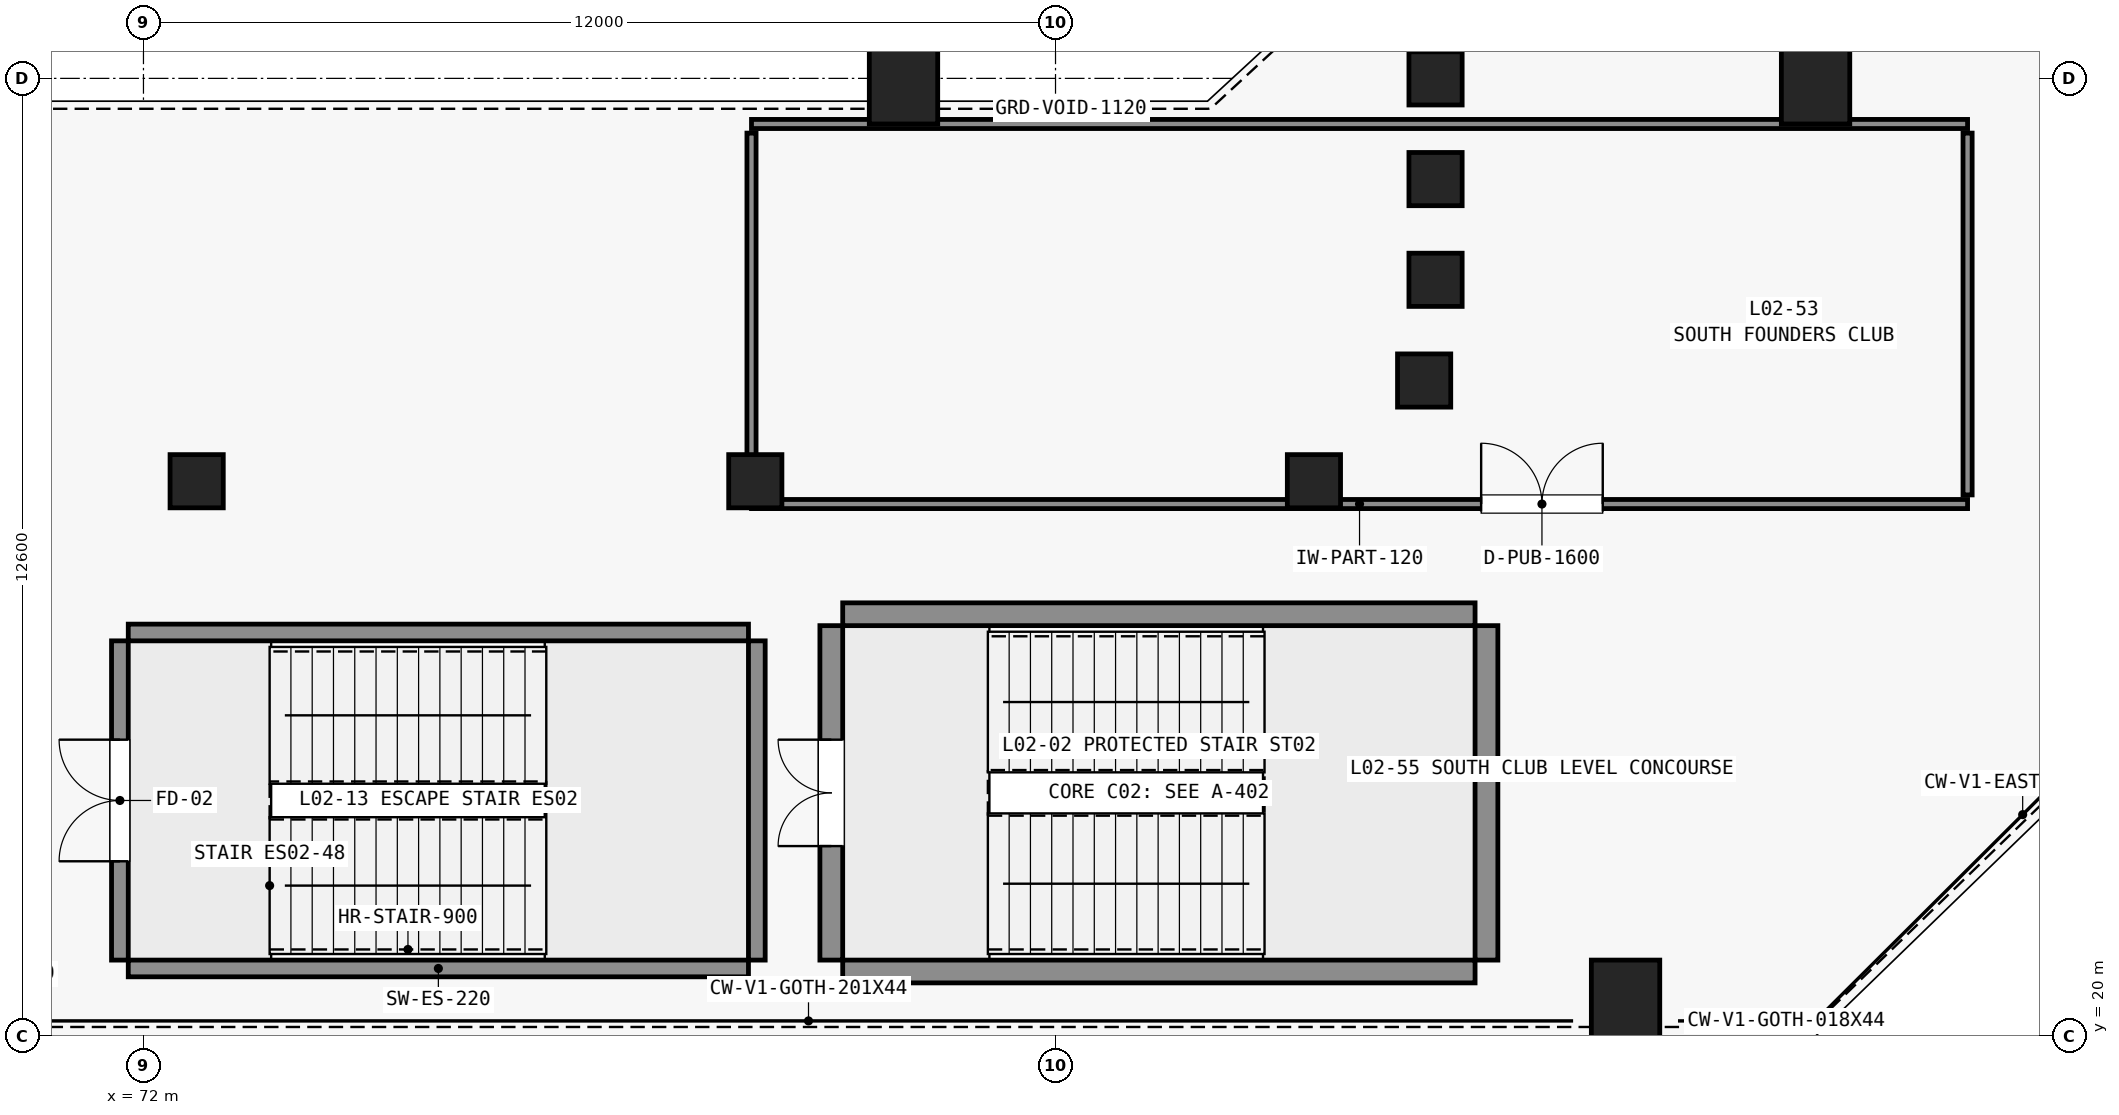
"""IFC4 building model, lengths in metres.
Left out: names, types, materials, properties, quantities, classifications, styles, units other than length and angle.
Written with IfcOpenShell. Run it as: python <this file> out.ifc"""

import sys

from ifc_helpers import new_model, si_unit, direction, frame, frame_2d, origin, origin_2d, place, context, subcontext, project, spatial, rectangle, extrude, element, fill, save


model = new_model("IFC4")
c1 = context("Model", 3, precision=1e-05, world=origin(), true_north=direction((0.0, 1.0)))
c2 = subcontext(c1, "Body", "Model", "MODEL_VIEW")
j1 = project(units=[si_unit("LENGTHUNIT", "METRE"), si_unit("PLANEANGLEUNIT", "RADIAN")], contexts=[c1])
p1 = place(None, origin())
s1 = spatial("IfcSite", under=j1, at=p1, CompositionType="ELEMENT")
p2 = place(p1, origin())
s2 = spatial("IfcBuilding", under=s1, at=p2, CompositionType="ELEMENT")
p3 = place(p2, frame((0.0, 0.0, 11.4)))
s3 = spatial("IfcBuildingStorey", under=s2, at=p3, CompositionType="ELEMENT", Elevation=11.4)
p4 = place(p3, frame((82.0, 32.6, 0.0), z_axis=(0.0, 0.0, 1.0), x_axis=(1.0, 0.0, 0.0)))
e1 = element("IfcColumn", 1, at=p4, inside=s3, PredefinedType="COLUMN", context=c2, shape_type="SweptSolid", body=[
    extrude(rectangle(XDim=0.9, YDim=1.2, at=origin_2d()), origin(), (0.0, 0.0, 1.0), 4.45),
])
p5 = place(p3, frame((94.0, 32.6, 0.0), z_axis=(0.0, 0.0, 1.0), x_axis=(1.0, 0.0, 0.0)))
e2 = element("IfcColumn", 2, at=p5, inside=s3, PredefinedType="COLUMN", context=c2, shape_type="SweptSolid", body=[
    extrude(rectangle(XDim=0.9, YDim=1.2, at=origin_2d()), origin(), (0.0, 0.0, 1.0), 4.8),
])
p6 = place(p3, frame((91.5, 20.4, 0.0), z_axis=(0.0, 0.0, 1.0), x_axis=(1.0, 0.0, 0.0)))
e3 = element("IfcColumn", 3, at=p6, inside=s3, PredefinedType="PILASTER", context=c2, shape_type="SweptSolid", body=[
    extrude(rectangle(XDim=0.9, YDim=1.2, at=origin_2d()), origin(), (0.0, 0.0, 1.0), 4.8),
])
for number, where, z_axis, x_axis in (
    (4, (81.2, 20.85, 0.0), (0.0, 0.0, 1.0), (1.0, 0.0, 0.0)),
    (5, (81.2, 25.55, 0.0), (0.0, 0.0, 1.0), (1.0, 0.0, 0.0)),
):
    element("IfcWall", number, at=place(p3, frame(where, z_axis=z_axis, x_axis=x_axis)), inside=s3, PredefinedType="SHEAR", context=c2, shape_type="SweptSolid", body=[
        extrude(rectangle(XDim=8.32, YDim=0.3, at=frame_2d((4.16, 0.0))), origin(), (0.0, 0.0, 1.0), 4.8),
    ])
p7 = place(p3, frame((81.05, 21.0, 0.0), z_axis=(0.0, 0.0, 1.0), x_axis=(0.0, 1.0, 0.0)))
e6 = element("IfcWall", 6, at=p7, inside=s3, PredefinedType="SHEAR", context=c2, shape_type="SweptSolid", body=[
    extrude(rectangle(XDim=4.4, YDim=0.3, at=frame_2d((2.2, 0.0))), origin(), (0.0, 0.0, 1.0), 4.8),
])
p8 = place(p7, frame((1.5, 0.0, 0.0)))
e7 = element("IfcOpeningElement", 7, at=p8, cuts=e6, PredefinedType="OPENING", context=c2, shape_type="SweptSolid", body=[
    extrude(rectangle(XDim=1.4, YDim=2.2, at=frame_2d((0.7, 1.1))), frame((0.0, 0.16, 0.0), z_axis=(0.0, -1.0, 0.0), x_axis=(1.0, 0.0, 0.0)), (0.0, 0.0, 1.0), 0.32),
])
p9 = place(p3, frame((89.67, 21.0, 0.0), z_axis=(0.0, 0.0, 1.0), x_axis=(0.0, 1.0, 0.0)))
e8 = element("IfcWall", 8, at=p9, inside=s3, PredefinedType="SHEAR", context=c2, shape_type="SweptSolid", body=[
    extrude(rectangle(XDim=4.4, YDim=0.3, at=frame_2d((2.2, 0.0))), origin(), (0.0, 0.0, 1.0), 4.8),
])
for number, where, z_axis, x_axis in (
    (9, (72.7, 27.3, 0.0), (0.0, 0.0, 1.0), (1.0, 0.0, 0.0)),
    (10, (80.05, 27.3, 0.0), (0.0, 0.0, 1.0), (1.0, 0.0, 0.0)),
    (11, (87.4, 27.3, 0.0), (0.0, 0.0, 1.0), (1.0, 0.0, 0.0)),
    (12, (88.85, 28.625, 0.0), (0.0, 0.0, 1.0), (1.0, 0.0, 0.0)),
    (13, (89.0, 29.95, 0.0), (0.0, 0.0, 1.0), (1.0, 0.0, 0.0)),
    (14, (89.0, 31.275, 0.0), (0.0, 0.0, 1.0), (1.0, 0.0, 0.0)),
    (15, (89.0, 32.6, 0.0), (0.0, 0.0, 1.0), (1.0, 0.0, 0.0)),
):
    element("IfcColumn", number, at=place(p3, frame(where, z_axis=z_axis, x_axis=x_axis)), inside=s3, PredefinedType="COLUMN", context=c2, shape_type="SweptSolid", body=[
        extrude(rectangle(XDim=0.7, YDim=0.7, at=origin_2d()), origin(), (0.0, 0.0, 1.0), 4.8),
    ])
for number, where, z_axis, x_axis in (
    (16, (71.8, 20.89, 0.0), (0.0, 0.0, 1.0), (1.0, 0.0, 0.0)),
    (17, (71.8, 25.31, 0.0), (0.0, 0.0, 1.0), (1.0, 0.0, 0.0)),
):
    element("IfcWall", number, at=place(p3, frame(where, z_axis=z_axis, x_axis=x_axis)), inside=s3, PredefinedType="SHEAR", context=c2, shape_type="SweptSolid", body=[
        extrude(rectangle(XDim=8.16, YDim=0.22, at=frame_2d((4.08, 0.0))), origin(), (0.0, 0.0, 1.0), 4.8),
    ])
p10 = place(p3, frame((71.69, 21.0, 0.0), z_axis=(0.0, 0.0, 1.0), x_axis=(0.0, 1.0, 0.0)))
e18 = element("IfcWall", 18, at=p10, inside=s3, PredefinedType="SHEAR", context=c2, shape_type="SweptSolid", body=[
    extrude(rectangle(XDim=4.2, YDim=0.22, at=frame_2d((2.1, 0.0))), origin(), (0.0, 0.0, 1.0), 4.8),
])
p11 = place(p10, frame((1.3, 0.0, 0.0)))
e19 = element("IfcOpeningElement", 19, at=p11, cuts=e18, PredefinedType="OPENING", context=c2, shape_type="SweptSolid", body=[
    extrude(rectangle(XDim=1.6, YDim=2.2, at=frame_2d((0.8, 1.1))), frame((0.0, 0.12, 0.0), z_axis=(0.0, -1.0, 0.0), x_axis=(1.0, 0.0, 0.0)), (0.0, 0.0, 1.0), 0.24),
])
p12 = place(p3, frame((80.07, 21.0, 0.0), z_axis=(0.0, 0.0, 1.0), x_axis=(0.0, 1.0, 0.0)))
e20 = element("IfcWall", 20, at=p12, inside=s3, PredefinedType="SHEAR", context=c2, shape_type="SweptSolid", body=[
    extrude(rectangle(XDim=4.2, YDim=0.22, at=frame_2d((2.1, 0.0))), origin(), (0.0, 0.0, 1.0), 4.8),
])
p13 = place(p3, frame((80.0, 27.0, 0.0), z_axis=(0.0, 0.0, 1.0), x_axis=(1.0, 0.0, 0.0)))
e21 = element("IfcWall", 21, at=p13, inside=s3, PredefinedType="PARTITIONING", context=c2, shape_type="SweptSolid", body=[
    extrude(rectangle(XDim=16.0, YDim=0.12, at=frame_2d((8.0, 0.0))), origin(), (0.0, 0.0, 1.0), 4.45),
])
p14 = place(p13, frame((9.6, 0.0, 0.0)))
e22 = element("IfcOpeningElement", 22, at=p14, cuts=e21, PredefinedType="OPENING", context=c2, shape_type="SweptSolid", body=[
    extrude(rectangle(XDim=1.6, YDim=2.25, at=frame_2d((0.8, 1.125))), frame((0.0, 0.07, 0.0), z_axis=(0.0, -1.0, 0.0), x_axis=(1.0, 0.0, 0.0)), (0.0, 0.0, 1.0), 0.14),
])
p15 = place(p3, frame((80.0, 32.0, 0.0), z_axis=(0.0, 0.0, 1.0), x_axis=(1.0, 0.0, 0.0)))
e23 = element("IfcWall", 23, at=p15, inside=s3, PredefinedType="PARTITIONING", context=c2, shape_type="SweptSolid", body=[
    extrude(rectangle(XDim=16.0, YDim=0.12, at=frame_2d((8.0, 0.0))), origin(), (0.0, 0.0, 1.0), 4.45),
])
for number, where, z_axis, x_axis in (
    (24, (80.0, 27.12, 0.0), (0.0, 0.0, 1.0), (0.0, 1.0, 0.0)),
    (25, (96.0, 27.12, 0.0), (0.0, 0.0, 1.0), (0.0, 1.0, 0.0)),
):
    element("IfcWall", number, at=place(p3, frame(where, z_axis=z_axis, x_axis=x_axis)), inside=s3, PredefinedType="PARTITIONING", context=c2, shape_type="SweptSolid", body=[
        extrude(rectangle(XDim=4.76, YDim=0.12, at=frame_2d((2.38, 0.0))), origin(), (0.0, 0.0, 1.0), 4.45),
    ])
p16 = place(p8, origin())
e26 = element("IfcDoor", 26, at=p16, inside=s3, OperationType="DOUBLE_DOOR_SINGLE_SWING", PredefinedType="DOOR", context=c2, shape_type="SweptSolid", body=[
    extrude(rectangle(XDim=1.4, YDim=2.2, at=frame_2d((0.7, 1.1))), frame((0.0, 0.025, 0.0), z_axis=(0.0, -1.0, 0.0), x_axis=(1.0, 0.0, 0.0)), (0.0, 0.0, 1.0), 0.05),
])
fill(e7, e26)
p17 = place(p11, origin())
e27 = element("IfcDoor", 27, at=p17, inside=s3, OperationType="DOUBLE_DOOR_SINGLE_SWING", PredefinedType="DOOR", context=c2, shape_type="SweptSolid", body=[
    extrude(rectangle(XDim=1.6, YDim=2.2, at=frame_2d((0.8, 1.1))), frame((0.0, 0.025, 0.0), z_axis=(0.0, -1.0, 0.0), x_axis=(1.0, 0.0, 0.0)), (0.0, 0.0, 1.0), 0.05),
])
fill(e19, e27)
p18 = place(p14, origin())
e28 = element("IfcDoor", 28, at=p18, inside=s3, OperationType="DOUBLE_DOOR_SINGLE_SWING", PredefinedType="DOOR", context=c2, shape_type="SweptSolid", body=[
    extrude(rectangle(XDim=1.6, YDim=2.25, at=frame_2d((0.8, 1.125))), frame((0.0, 0.025, 0.0), z_axis=(0.0, -1.0, 0.0), x_axis=(1.0, 0.0, 0.0)), (0.0, 0.0, 1.0), 0.05),
])
fill(e22, e28)
save(model, sys.argv[1])
